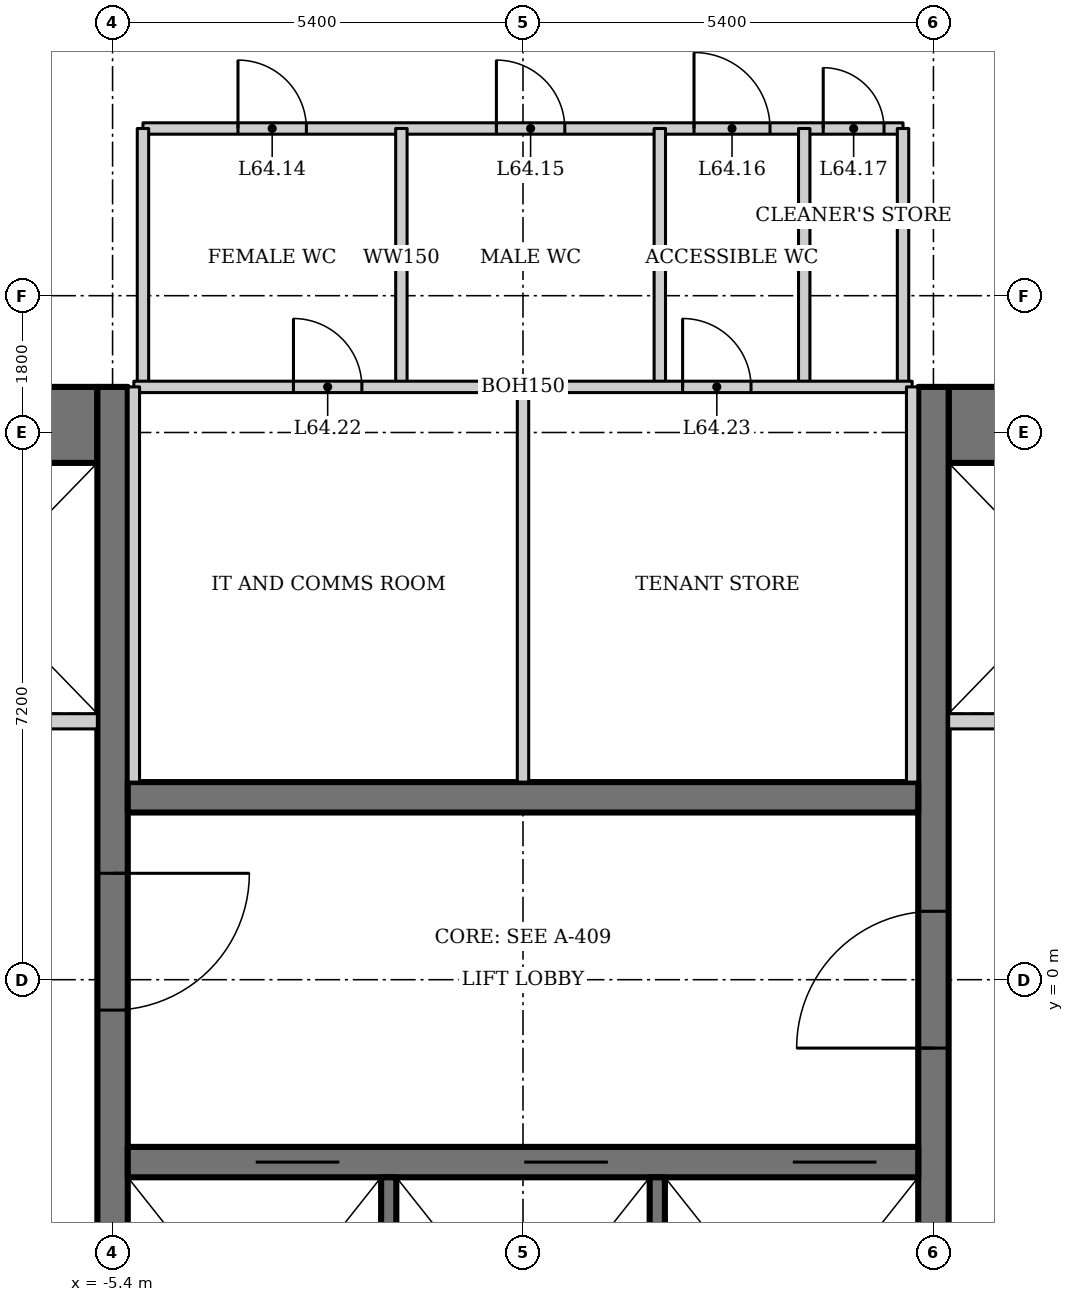
"""IFC4 building model, lengths in metres.
Left out: names, types, materials, properties, quantities, classifications, styles, units other than length and angle.
Written with IfcOpenShell. Run it as: python <this file> out.ifc"""

import sys

from ifc_helpers import new_model, si_unit, direction, frame, frame_2d, origin, place, context, subcontext, project, spatial, rectangle, extrude, element, fill, save


model = new_model("IFC4")
c1 = context("Model", 3, precision=1e-05, world=origin(), true_north=direction((0.0, 1.0)))
c2 = subcontext(c1, "Body", "Model", "MODEL_VIEW")
j1 = project(units=[si_unit("LENGTHUNIT", "METRE"), si_unit("PLANEANGLEUNIT", "RADIAN")], contexts=[c1])
p1 = place(None, origin())
s1 = spatial("IfcSite", under=j1, at=p1, CompositionType="ELEMENT")
p2 = place(p1, origin())
s2 = spatial("IfcBuilding", under=s1, at=p2, CompositionType="ELEMENT")
p3 = place(p2, frame((0.0, 0.0, 274.9)))
s3 = spatial("IfcBuildingStorey", under=s2, at=p3, CompositionType="ELEMENT", Elevation=274.9)
for number, where, z_axis, x_axis in (
    (1, (12.2, 7.3, 0.0), (0.0, 0.0, 1.0), (-1.0, 0.0, 0.0)),
    (2, (-5.6, 7.3, 0.0), (0.0, 0.0, 1.0), (-1.0, 0.0, 0.0)),
):
    element("IfcWall", number, at=place(p3, frame(where, z_axis=z_axis, x_axis=x_axis)), inside=s3, PredefinedType="SHEAR", context=c2, shape_type="SweptSolid", body=[
        extrude(rectangle(XDim=6.6, YDim=1.0, at=frame_2d((3.3, 0.0))), origin(), (0.0, 0.0, 1.0), 4.5),
    ])
p4 = place(p3, frame((5.4, -6.8, 0.0), z_axis=(0.0, 0.0, 1.0), x_axis=(0.0, 1.0, 0.0)))
e3 = element("IfcWall", 3, at=p4, inside=s3, PredefinedType="SHEAR", context=c2, shape_type="SweptSolid", body=[
    extrude(rectangle(XDim=14.6, YDim=0.4, at=frame_2d((7.3, 0.0))), origin(), (0.0, 0.0, 1.0), 4.5),
])
p5 = place(p4, frame((5.9, 0.0, 0.0)))
e4 = element("IfcOpeningElement", 4, at=p5, cuts=e3, PredefinedType="OPENING", context=c2, shape_type="SweptSolid", body=[
    extrude(rectangle(XDim=1.8, YDim=2.1, at=frame_2d((0.9, 1.05))), frame((0.0, 0.21, 0.0), z_axis=(0.0, -1.0, 0.0), x_axis=(1.0, 0.0, 0.0)), (0.0, 0.0, 1.0), 0.42),
])
p6 = place(p3, frame((-5.4, 7.8, 0.0), z_axis=(0.0, 0.0, 1.0), x_axis=(0.0, -1.0, 0.0)))
e5 = element("IfcWall", 5, at=p6, inside=s3, PredefinedType="SHEAR", context=c2, shape_type="SweptSolid", body=[
    extrude(rectangle(XDim=14.6, YDim=0.4, at=frame_2d((7.3, 0.0))), origin(), (0.0, 0.0, 1.0), 4.5),
])
p7 = place(p6, frame((6.4, 0.0, 0.0)))
e6 = element("IfcOpeningElement", 6, at=p7, cuts=e5, PredefinedType="OPENING", context=c2, shape_type="SweptSolid", body=[
    extrude(rectangle(XDim=1.8, YDim=2.1, at=frame_2d((0.9, 1.05))), frame((0.0, 0.21, 0.0), z_axis=(0.0, -1.0, 0.0), x_axis=(1.0, 0.0, 0.0)), (0.0, 0.0, 1.0), 0.42),
])
p8 = place(p3, frame((-5.2, -2.4, 0.0), z_axis=(0.0, 0.0, 1.0), x_axis=(1.0, 0.0, 0.0)))
e7 = element("IfcWall", 7, at=p8, inside=s3, PredefinedType="SHEAR", context=c2, shape_type="SweptSolid", body=[
    extrude(rectangle(XDim=10.4, YDim=0.4, at=frame_2d((5.2, 0.0))), origin(), (0.0, 0.0, 1.0), 4.5),
])
p9 = place(p8, frame((1.683, 0.0, 0.0)))
e8 = element("IfcOpeningElement", 8, at=p9, cuts=e7, PredefinedType="OPENING", context=c2, shape_type="SweptSolid", body=[
    extrude(rectangle(XDim=1.1, YDim=2.2, at=frame_2d((0.55, 1.1))), frame((0.0, 0.21, 0.0), z_axis=(0.0, -1.0, 0.0), x_axis=(1.0, 0.0, 0.0)), (0.0, 0.0, 1.0), 0.42),
])
p10 = place(p8, frame((5.217, 0.0, 0.0)))
e9 = element("IfcOpeningElement", 9, at=p10, cuts=e7, PredefinedType="OPENING", context=c2, shape_type="SweptSolid", body=[
    extrude(rectangle(XDim=1.1, YDim=2.2, at=frame_2d((0.55, 1.1))), frame((0.0, 0.21, 0.0), z_axis=(0.0, -1.0, 0.0), x_axis=(1.0, 0.0, 0.0)), (0.0, 0.0, 1.0), 0.42),
])
p11 = place(p8, frame((8.75, 0.0, 0.0)))
e10 = element("IfcOpeningElement", 10, at=p11, cuts=e7, PredefinedType="OPENING", context=c2, shape_type="SweptSolid", body=[
    extrude(rectangle(XDim=1.1, YDim=2.2, at=frame_2d((0.55, 1.1))), frame((0.0, 0.21, 0.0), z_axis=(0.0, -1.0, 0.0), x_axis=(1.0, 0.0, 0.0)), (0.0, 0.0, 1.0), 0.42),
])
for number, where, z_axis, x_axis in (
    (11, (-1.767, -2.6, 0.0), (0.0, 0.0, 1.0), (0.0, -1.0, 0.0)),
    (12, (1.767, -2.6, 0.0), (0.0, 0.0, 1.0), (0.0, -1.0, 0.0)),
):
    element("IfcWall", number, at=place(p3, frame(where, z_axis=z_axis, x_axis=x_axis)), inside=s3, PredefinedType="SOLIDWALL", context=c2, shape_type="SweptSolid", body=[
        extrude(rectangle(XDim=4.2, YDim=0.2, at=frame_2d((2.1, 0.0))), origin(), (0.0, 0.0, 1.0), 4.5),
    ])
p12 = place(p3, frame((5.2, 2.4, 0.0), z_axis=(0.0, 0.0, 1.0), x_axis=(-1.0, 0.0, 0.0)))
e13 = element("IfcWall", 13, at=p12, inside=s3, PredefinedType="SHEAR", context=c2, shape_type="SweptSolid", body=[
    extrude(rectangle(XDim=10.4, YDim=0.4, at=frame_2d((5.2, 0.0))), origin(), (0.0, 0.0, 1.0), 4.5),
])
p13 = place(p3, frame((12.2, 3.4, 0.0), z_axis=(0.0, 0.0, 1.0), x_axis=(-1.0, 0.0, 0.0)))
e14 = element("IfcWall", 14, at=p13, inside=s3, PredefinedType="SOLIDWALL", context=c2, shape_type="SweptSolid", body=[
    extrude(rectangle(XDim=6.6, YDim=0.2, at=frame_2d((3.3, 0.0))), origin(), (0.0, 0.0, 1.0), 4.5),
])
p14 = place(p13, frame((4.45, 0.0, 0.0)))
e15 = element("IfcOpeningElement", 15, at=p14, cuts=e14, PredefinedType="OPENING", context=c2, shape_type="SweptSolid", body=[
    extrude(rectangle(XDim=1.1, YDim=2.2, at=frame_2d((0.55, 1.1))), frame((0.0, 0.11, 0.0), z_axis=(0.0, -1.0, 0.0), x_axis=(1.0, 0.0, 0.0)), (0.0, 0.0, 1.0), 0.22),
])
p15 = place(p13, frame((0.9, 0.0, 0.0)))
e16 = element("IfcOpeningElement", 16, at=p15, cuts=e14, PredefinedType="OPENING", context=c2, shape_type="SweptSolid", body=[
    extrude(rectangle(XDim=1.4, YDim=2.2, at=frame_2d((0.7, 1.1))), frame((0.0, 0.11, 0.0), z_axis=(0.0, -1.0, 0.0), x_axis=(1.0, 0.0, 0.0)), (0.0, 0.0, 1.0), 0.22),
])
p16 = place(p3, frame((-12.2, 3.4, 0.0), z_axis=(0.0, 0.0, 1.0), x_axis=(1.0, 0.0, 0.0)))
e17 = element("IfcWall", 17, at=p16, inside=s3, PredefinedType="SOLIDWALL", context=c2, shape_type="SweptSolid", body=[
    extrude(rectangle(XDim=6.6, YDim=0.2, at=frame_2d((3.3, 0.0))), origin(), (0.0, 0.0, 1.0), 4.5),
])
p17 = place(p16, frame((1.05, 0.0, 0.0)))
e18 = element("IfcOpeningElement", 18, at=p17, cuts=e17, PredefinedType="OPENING", context=c2, shape_type="SweptSolid", body=[
    extrude(rectangle(XDim=1.1, YDim=2.2, at=frame_2d((0.55, 1.1))), frame((0.0, 0.11, 0.0), z_axis=(0.0, -1.0, 0.0), x_axis=(1.0, 0.0, 0.0)), (0.0, 0.0, 1.0), 0.22),
])
p18 = place(p16, frame((4.3, 0.0, 0.0)))
e19 = element("IfcOpeningElement", 19, at=p18, cuts=e17, PredefinedType="OPENING", context=c2, shape_type="SweptSolid", body=[
    extrude(rectangle(XDim=1.4, YDim=2.2, at=frame_2d((0.7, 1.1))), frame((0.0, 0.11, 0.0), z_axis=(0.0, -1.0, 0.0), x_axis=(1.0, 0.0, 0.0)), (0.0, 0.0, 1.0), 0.22),
])
p19 = place(p3, frame((-5.0, 11.2, 0.0), z_axis=(0.0, 0.0, 1.0), x_axis=(1.0, 0.0, 0.0)))
e20 = element("IfcWall", 20, at=p19, inside=s3, PredefinedType="SOLIDWALL", context=c2, shape_type="SweptSolid", body=[
    extrude(rectangle(XDim=10.0, YDim=0.15, at=frame_2d((5.0, 0.0))), origin(), (0.0, 0.0, 1.0), 4.35),
])
p20 = place(p19, frame((1.25, 0.0, 0.0)))
e21 = element("IfcOpeningElement", 21, at=p20, cuts=e20, PredefinedType="OPENING", context=c2, shape_type="SweptSolid", body=[
    extrude(rectangle(XDim=0.9, YDim=2.1, at=frame_2d((0.45, 1.05))), frame((0.0, 0.085, 0.0), z_axis=(0.0, -1.0, 0.0), x_axis=(1.0, 0.0, 0.0)), (0.0, 0.0, 1.0), 0.17),
])
p21 = place(p19, frame((4.65, 0.0, 0.0)))
e22 = element("IfcOpeningElement", 22, at=p21, cuts=e20, PredefinedType="OPENING", context=c2, shape_type="SweptSolid", body=[
    extrude(rectangle(XDim=0.9, YDim=2.1, at=frame_2d((0.45, 1.05))), frame((0.0, 0.085, 0.0), z_axis=(0.0, -1.0, 0.0), x_axis=(1.0, 0.0, 0.0)), (0.0, 0.0, 1.0), 0.17),
])
p22 = place(p19, frame((7.25, 0.0, 0.0)))
e23 = element("IfcOpeningElement", 23, at=p22, cuts=e20, PredefinedType="OPENING", context=c2, shape_type="SweptSolid", body=[
    extrude(rectangle(XDim=1.0, YDim=2.1, at=frame_2d((0.5, 1.05))), frame((0.0, 0.085, 0.0), z_axis=(0.0, -1.0, 0.0), x_axis=(1.0, 0.0, 0.0)), (0.0, 0.0, 1.0), 0.17),
])
p23 = place(p19, frame((8.95, 0.0, 0.0)))
e24 = element("IfcOpeningElement", 24, at=p23, cuts=e20, PredefinedType="OPENING", context=c2, shape_type="SweptSolid", body=[
    extrude(rectangle(XDim=0.8, YDim=2.1, at=frame_2d((0.4, 1.05))), frame((0.0, 0.085, 0.0), z_axis=(0.0, -1.0, 0.0), x_axis=(1.0, 0.0, 0.0)), (0.0, 0.0, 1.0), 0.17),
])
for number, where, z_axis, x_axis in (
    (25, (-5.0, 7.8, 0.0), (0.0, 0.0, 1.0), (0.0, 1.0, 0.0)),
    (26, (5.0, 7.8, 0.0), (0.0, 0.0, 1.0), (0.0, 1.0, 0.0)),
    (27, (-1.6, 7.8, 0.0), (0.0, 0.0, 1.0), (0.0, 1.0, 0.0)),
):
    element("IfcWall", number, at=place(p3, frame(where, z_axis=z_axis, x_axis=x_axis)), inside=s3, PredefinedType="SOLIDWALL", context=c2, shape_type="SweptSolid", body=[
        extrude(rectangle(XDim=3.4, YDim=0.15, at=frame_2d((1.7, 0.0))), origin(), (0.0, 0.0, 1.0), 4.35),
    ])
p24 = place(p3, frame((1.8, 7.8, 0.0), z_axis=(0.0, 0.0, 1.0), x_axis=(0.0, 1.0, 0.0)))
e28 = element("IfcWall", 28, at=p24, inside=s3, PredefinedType="SOLIDWALL", context=c2, shape_type="SweptSolid", body=[
    extrude(rectangle(XDim=3.4, YDim=0.15, at=frame_2d((1.7, 0.0))), origin(), (0.0, 0.0, 1.0), 3.408),
])
p25 = place(p3, frame((3.7, 7.8, 0.0), z_axis=(0.0, 0.0, 1.0), x_axis=(0.0, 1.0, 0.0)))
e29 = element("IfcWall", 29, at=p25, inside=s3, PredefinedType="SOLIDWALL", context=c2, shape_type="SweptSolid", body=[
    extrude(rectangle(XDim=3.4, YDim=0.15, at=frame_2d((1.7, 0.0))), origin(), (0.0, 0.0, 1.0), 4.35),
])
p26 = place(p3, frame((-5.12, 7.8, 0.0), z_axis=(0.0, 0.0, 1.0), x_axis=(1.0, 0.0, 0.0)))
e30 = element("IfcWall", 30, at=p26, inside=s3, PredefinedType="PARTITIONING", context=c2, shape_type="SweptSolid", body=[
    extrude(rectangle(XDim=10.24, YDim=0.15, at=frame_2d((5.12, 0.0))), origin(), (0.0, 0.0, 1.0), 4.35),
])
p27 = place(p26, frame((2.1, 0.0, 0.0)))
e31 = element("IfcOpeningElement", 31, at=p27, cuts=e30, PredefinedType="OPENING", context=c2, shape_type="SweptSolid", body=[
    extrude(rectangle(XDim=0.9, YDim=2.1, at=frame_2d((0.45, 1.05))), frame((0.0, 0.085, 0.0), z_axis=(0.0, -1.0, 0.0), x_axis=(1.0, 0.0, 0.0)), (0.0, 0.0, 1.0), 0.17),
])
p28 = place(p26, frame((7.22, 0.0, 0.0)))
e32 = element("IfcOpeningElement", 32, at=p28, cuts=e30, PredefinedType="OPENING", context=c2, shape_type="SweptSolid", body=[
    extrude(rectangle(XDim=0.9, YDim=2.1, at=frame_2d((0.45, 1.05))), frame((0.0, 0.085, 0.0), z_axis=(0.0, -1.0, 0.0), x_axis=(1.0, 0.0, 0.0)), (0.0, 0.0, 1.0), 0.17),
])
for number, where, z_axis, x_axis in (
    (33, (-5.12, 2.6, 0.0), (0.0, 0.0, 1.0), (0.0, 1.0, 0.0)),
    (34, (5.12, 2.6, 0.0), (0.0, 0.0, 1.0), (0.0, 1.0, 0.0)),
):
    element("IfcWall", number, at=place(p3, frame(where, z_axis=z_axis, x_axis=x_axis)), inside=s3, PredefinedType="PARTITIONING", context=c2, shape_type="SweptSolid", body=[
        extrude(rectangle(XDim=5.2, YDim=0.15, at=frame_2d((2.6, 0.0))), origin(), (0.0, 0.0, 1.0), 4.35),
    ])
p29 = place(p3, frame((0.0, 2.6, 0.0), z_axis=(0.0, 0.0, 1.0), x_axis=(0.0, 1.0, 0.0)))
e35 = element("IfcWall", 35, at=p29, inside=s3, PredefinedType="PARTITIONING", context=c2, shape_type="SweptSolid", body=[
    extrude(rectangle(XDim=5.2, YDim=0.15, at=frame_2d((2.6, 0.0))), origin(), (0.0, 0.0, 1.0), 3.944),
])
p30 = place(p5, origin())
e36 = element("IfcDoor", 36, at=p30, inside=s3, OperationType="DOUBLE_DOOR_DOUBLE_SWING", PredefinedType="DOOR", context=c2, shape_type="SweptSolid", body=[
    extrude(rectangle(XDim=1.8, YDim=2.1, at=frame_2d((0.9, 1.05))), frame((0.0, 0.025, 0.0), z_axis=(0.0, -1.0, 0.0), x_axis=(1.0, 0.0, 0.0)), (0.0, 0.0, 1.0), 0.05),
])
fill(e4, e36)
p31 = place(p7, origin())
e37 = element("IfcDoor", 37, at=p31, inside=s3, OperationType="DOUBLE_DOOR_DOUBLE_SWING", PredefinedType="DOOR", context=c2, shape_type="SweptSolid", body=[
    extrude(rectangle(XDim=1.8, YDim=2.1, at=frame_2d((0.9, 1.05))), frame((0.0, 0.025, 0.0), z_axis=(0.0, -1.0, 0.0), x_axis=(1.0, 0.0, 0.0)), (0.0, 0.0, 1.0), 0.05),
])
fill(e6, e37)
p32 = place(p9, origin())
e38 = element("IfcDoor", 38, at=p32, inside=s3, OperationType="DOUBLE_DOOR_SLIDING", PredefinedType="DOOR", context=c2, shape_type="SweptSolid", body=[
    extrude(rectangle(XDim=1.1, YDim=2.2, at=frame_2d((0.55, 1.1))), frame((0.0, 0.025, 0.0), z_axis=(0.0, -1.0, 0.0), x_axis=(1.0, 0.0, 0.0)), (0.0, 0.0, 1.0), 0.05),
])
fill(e8, e38)
p33 = place(p10, origin())
e39 = element("IfcDoor", 39, at=p33, inside=s3, OperationType="DOUBLE_DOOR_SLIDING", PredefinedType="DOOR", context=c2, shape_type="SweptSolid", body=[
    extrude(rectangle(XDim=1.1, YDim=2.2, at=frame_2d((0.55, 1.1))), frame((0.0, 0.025, 0.0), z_axis=(0.0, -1.0, 0.0), x_axis=(1.0, 0.0, 0.0)), (0.0, 0.0, 1.0), 0.05),
])
fill(e9, e39)
p34 = place(p11, origin())
e40 = element("IfcDoor", 40, at=p34, inside=s3, OperationType="DOUBLE_DOOR_SLIDING", PredefinedType="DOOR", context=c2, shape_type="SweptSolid", body=[
    extrude(rectangle(XDim=1.1, YDim=2.2, at=frame_2d((0.55, 1.1))), frame((0.0, 0.025, 0.0), z_axis=(0.0, -1.0, 0.0), x_axis=(1.0, 0.0, 0.0)), (0.0, 0.0, 1.0), 0.05),
])
fill(e10, e40)
p35 = place(p20, origin())
e41 = element("IfcDoor", 41, at=p35, inside=s3, OperationType="SINGLE_SWING_LEFT", PredefinedType="DOOR", context=c2, shape_type="SweptSolid", body=[
    extrude(rectangle(XDim=0.9, YDim=2.1, at=frame_2d((0.45, 1.05))), frame((0.0, 0.025, 0.0), z_axis=(0.0, -1.0, 0.0), x_axis=(1.0, 0.0, 0.0)), (0.0, 0.0, 1.0), 0.05),
])
fill(e21, e41)
p36 = place(p21, origin())
e42 = element("IfcDoor", 42, at=p36, inside=s3, OperationType="SINGLE_SWING_LEFT", PredefinedType="DOOR", context=c2, shape_type="SweptSolid", body=[
    extrude(rectangle(XDim=0.9, YDim=2.1, at=frame_2d((0.45, 1.05))), frame((0.0, 0.025, 0.0), z_axis=(0.0, -1.0, 0.0), x_axis=(1.0, 0.0, 0.0)), (0.0, 0.0, 1.0), 0.05),
])
fill(e22, e42)
p37 = place(p22, origin())
e43 = element("IfcDoor", 43, at=p37, inside=s3, OperationType="SINGLE_SWING_LEFT", PredefinedType="DOOR", context=c2, shape_type="SweptSolid", body=[
    extrude(rectangle(XDim=1.0, YDim=2.1, at=frame_2d((0.5, 1.05))), frame((0.0, 0.025, 0.0), z_axis=(0.0, -1.0, 0.0), x_axis=(1.0, 0.0, 0.0)), (0.0, 0.0, 1.0), 0.05),
])
fill(e23, e43)
p38 = place(p23, origin())
e44 = element("IfcDoor", 44, at=p38, inside=s3, OperationType="SINGLE_SWING_LEFT", PredefinedType="DOOR", context=c2, shape_type="SweptSolid", body=[
    extrude(rectangle(XDim=0.8, YDim=2.1, at=frame_2d((0.4, 1.05))), frame((0.0, 0.025, 0.0), z_axis=(0.0, -1.0, 0.0), x_axis=(1.0, 0.0, 0.0)), (0.0, 0.0, 1.0), 0.05),
])
fill(e24, e44)
p39 = place(p27, origin())
e45 = element("IfcDoor", 45, at=p39, inside=s3, OperationType="SINGLE_SWING_LEFT", PredefinedType="DOOR", context=c2, shape_type="SweptSolid", body=[
    extrude(rectangle(XDim=0.9, YDim=2.1, at=frame_2d((0.45, 1.05))), frame((0.0, 0.025, 0.0), z_axis=(0.0, -1.0, 0.0), x_axis=(1.0, 0.0, 0.0)), (0.0, 0.0, 1.0), 0.05),
])
fill(e31, e45)
p40 = place(p28, origin())
e46 = element("IfcDoor", 46, at=p40, inside=s3, OperationType="SINGLE_SWING_LEFT", PredefinedType="DOOR", context=c2, shape_type="SweptSolid", body=[
    extrude(rectangle(XDim=0.9, YDim=2.1, at=frame_2d((0.45, 1.05))), frame((0.0, 0.025, 0.0), z_axis=(0.0, -1.0, 0.0), x_axis=(1.0, 0.0, 0.0)), (0.0, 0.0, 1.0), 0.05),
])
fill(e32, e46)
save(model, sys.argv[1])
